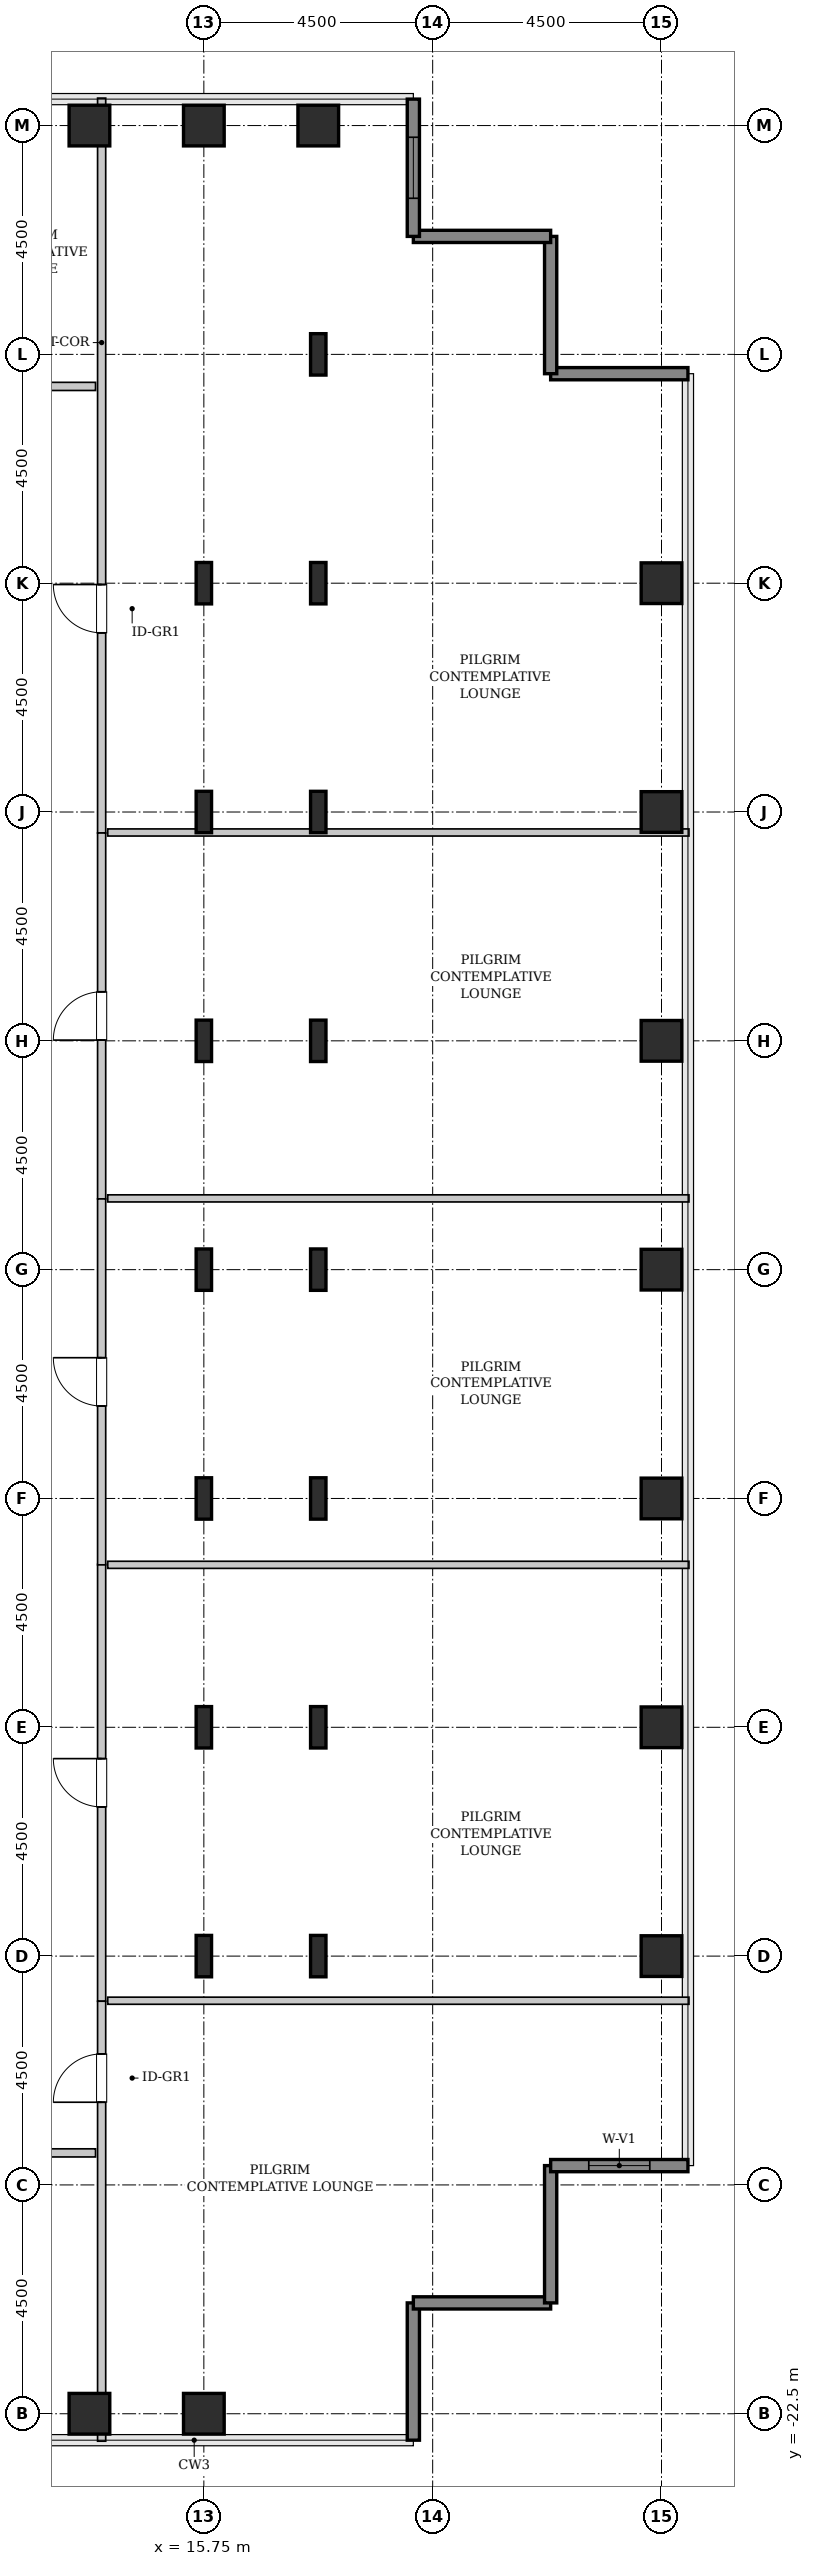
"""IFC4 building model, lengths in metres.
Left out: names, types, materials, properties, quantities, classifications, styles, units other than length and angle.
Written with IfcOpenShell. Run it as: python <this file> out.ifc"""

import sys

from ifc_helpers import new_model, si_unit, direction, frame, frame_2d, origin, origin_2d, place, context, subcontext, project, spatial, rectangle, hollow_rectangle, i_section, extrude, source, transform, mapped, element, fill, save


model = new_model("IFC4")
c1 = context("Model", 3, precision=1e-05, world=origin(), true_north=direction((0.0, 1.0)))
c2 = subcontext(c1, "Body", "Model", "MODEL_VIEW")
j1 = project(units=[si_unit("LENGTHUNIT", "METRE"), si_unit("PLANEANGLEUNIT", "RADIAN")], contexts=[c1])
p1 = place(None, origin())
s1 = spatial("IfcSite", under=j1, at=p1, CompositionType="ELEMENT")
p2 = place(p1, origin())
s2 = spatial("IfcBuilding", under=s1, at=p2, CompositionType="ELEMENT")
p3 = place(p2, frame((0.0, 0.0, 186.8)))
s3 = spatial("IfcBuildingStorey", under=s2, at=p3, CompositionType="ELEMENT", Elevation=186.8)
m1 = source(origin(), c2, "Body", "SweptSolid", [
    extrude(hollow_rectangle(XDim=0.8, YDim=0.8, WallThickness=0.04, InnerFilletRadius=0.04, OuterFilletRadius=0.08, at=origin_2d()), origin(), (0.0, 0.0, 1.0), 3.8),
])
for number, where, z_axis, x_axis in (
    (1, (13.5, -22.5, 0.0), (0.0, 0.0, 1.0), (1.0, 0.0, 0.0)),
    (2, (13.5, 22.5, 0.0), (0.0, 0.0, 1.0), (1.0, 0.0, 0.0)),
    (3, (15.75, -22.5, 0.0), (0.0, 0.0, 1.0), (1.0, 0.0, 0.0)),
):
    element("IfcColumn", number, at=place(p3, frame(where, z_axis=z_axis, x_axis=x_axis)), inside=s3, PredefinedType="COLUMN", context=c2, shape_type="MappedRepresentation", body=[
        mapped(m1, transform((0.0, 0.0, 0.0), x_axis=(1.0, 0.0, 0.0), y_axis=(0.0, 1.0, 0.0), z_axis=(0.0, 0.0, 1.0), scale=1.0)),
    ])
m2 = source(origin(), c2, "Body", "SweptSolid", [
    extrude(i_section(OverallWidth=0.303, OverallDepth=0.814, WebThickness=0.021, FlangeThickness=0.04, FilletRadius=0.03, at=origin_2d()), origin(), (0.0, 0.0, 1.0), 3.8),
])
for number, where, z_axis, x_axis in (
    (4, (15.75, -13.5, 0.0), (0.0, 0.0, 1.0), (1.0, 0.0, 0.0)),
    (5, (15.75, -9.0, 0.0), (0.0, 0.0, 1.0), (1.0, 0.0, 0.0)),
    (6, (15.75, -4.5, 0.0), (0.0, 0.0, 1.0), (1.0, 0.0, 0.0)),
    (7, (15.75, 0.0, 0.0), (0.0, 0.0, 1.0), (1.0, 0.0, 0.0)),
    (8, (15.75, 4.5, 0.0), (0.0, 0.0, 1.0), (1.0, 0.0, 0.0)),
    (9, (15.75, 9.0, 0.0), (0.0, 0.0, 1.0), (1.0, 0.0, 0.0)),
    (10, (15.75, 13.5, 0.0), (0.0, 0.0, 1.0), (1.0, 0.0, 0.0)),
):
    element("IfcColumn", number, at=place(p3, frame(where, z_axis=z_axis, x_axis=x_axis)), inside=s3, PredefinedType="COLUMN", context=c2, shape_type="MappedRepresentation", body=[
        mapped(m2, transform((0.0, 0.0, 0.0), x_axis=(1.0, 0.0, 0.0), y_axis=(0.0, 1.0, 0.0), z_axis=(0.0, 0.0, 1.0), scale=1.0)),
    ])
p4 = place(p3, frame((15.75, 22.5, 0.0), z_axis=(0.0, 0.0, 1.0), x_axis=(1.0, 0.0, 0.0)))
e11 = element("IfcColumn", 11, at=p4, inside=s3, PredefinedType="COLUMN", context=c2, shape_type="MappedRepresentation", body=[
    mapped(m1, transform((0.0, 0.0, 0.0), x_axis=(1.0, 0.0, 0.0), y_axis=(0.0, 1.0, 0.0), z_axis=(0.0, 0.0, 1.0), scale=1.0)),
])
for number, where, z_axis, x_axis in (
    (12, (18.0, -13.5, 0.0), (0.0, 0.0, 1.0), (1.0, 0.0, 0.0)),
    (13, (18.0, -9.0, 0.0), (0.0, 0.0, 1.0), (1.0, 0.0, 0.0)),
    (14, (18.0, -4.5, 0.0), (0.0, 0.0, 1.0), (1.0, 0.0, 0.0)),
    (15, (18.0, 0.0, 0.0), (0.0, 0.0, 1.0), (1.0, 0.0, 0.0)),
    (16, (18.0, 4.5, 0.0), (0.0, 0.0, 1.0), (1.0, 0.0, 0.0)),
    (17, (18.0, 9.0, 0.0), (0.0, 0.0, 1.0), (1.0, 0.0, 0.0)),
    (18, (18.0, 13.5, 0.0), (0.0, 0.0, 1.0), (1.0, 0.0, 0.0)),
    (19, (18.0, 18.0, 0.0), (0.0, 0.0, 1.0), (1.0, 0.0, 0.0)),
):
    element("IfcColumn", number, at=place(p3, frame(where, z_axis=z_axis, x_axis=x_axis)), inside=s3, PredefinedType="COLUMN", context=c2, shape_type="MappedRepresentation", body=[
        mapped(m2, transform((0.0, 0.0, 0.0), x_axis=(1.0, 0.0, 0.0), y_axis=(0.0, 1.0, 0.0), z_axis=(0.0, 0.0, 1.0), scale=1.0)),
    ])
for number, where, z_axis, x_axis in (
    (20, (18.0, 22.5, 0.0), (0.0, 0.0, 1.0), (1.0, 0.0, 0.0)),
    (21, (24.75, -13.5, 0.0), (0.0, 0.0, 1.0), (1.0, 0.0, 0.0)),
    (22, (24.75, -9.0, 0.0), (0.0, 0.0, 1.0), (1.0, 0.0, 0.0)),
    (23, (24.75, -4.5, 0.0), (0.0, 0.0, 1.0), (1.0, 0.0, 0.0)),
    (24, (24.75, 0.0, 0.0), (0.0, 0.0, 1.0), (1.0, 0.0, 0.0)),
    (25, (24.75, 4.5, 0.0), (0.0, 0.0, 1.0), (1.0, 0.0, 0.0)),
    (26, (24.75, 9.0, 0.0), (0.0, 0.0, 1.0), (1.0, 0.0, 0.0)),
    (27, (24.75, 13.5, 0.0), (0.0, 0.0, 1.0), (1.0, 0.0, 0.0)),
):
    element("IfcColumn", number, at=place(p3, frame(where, z_axis=z_axis, x_axis=x_axis)), inside=s3, PredefinedType="COLUMN", context=c2, shape_type="MappedRepresentation", body=[
        mapped(m1, transform((0.0, 0.0, 0.0), x_axis=(1.0, 0.0, 0.0), y_axis=(0.0, 1.0, 0.0), z_axis=(0.0, 0.0, 1.0), scale=1.0)),
    ])
m3 = source(origin(), c2, "Body", "SweptSolid", [
    extrude(rectangle(XDim=2.7, YDim=0.24, at=frame_2d((1.35, 0.0))), origin(), (0.0, 0.0, 1.0), 3.55),
])
for number, where, z_axis, x_axis in (
    (28, (19.87, -23.02, 0.0), (0.0, 0.0, 1.0), (0.0, 1.0, 0.0)),
    (29, (19.87, -20.32, 0.0), (0.0, 0.0, 1.0), (1.0, 0.0, 0.0)),
    (30, (22.57, -20.32, 0.0), (0.0, 0.0, 1.0), (0.0, 1.0, 0.0)),
):
    element("IfcWall", number, at=place(p3, frame(where, z_axis=z_axis, x_axis=x_axis)), inside=s3, PredefinedType="SHEAR", context=c2, shape_type="MappedRepresentation", body=[
        mapped(m3, transform((0.0, 0.0, 0.0), x_axis=(1.0, 0.0, 0.0), y_axis=(0.0, 1.0, 0.0), z_axis=(0.0, 0.0, 1.0), scale=1.0)),
    ])
p5 = place(p3, frame((22.57, -17.62, 0.0), z_axis=(0.0, 0.0, 1.0), x_axis=(1.0, 0.0, 0.0)))
e31 = element("IfcWall", 31, at=p5, inside=s3, PredefinedType="SHEAR", context=c2, shape_type="MappedRepresentation", body=[
    mapped(m3, transform((0.0, 0.0, 0.0), x_axis=(1.0, 0.0, 0.0), y_axis=(0.0, 1.0, 0.0), z_axis=(0.0, 0.0, 1.0), scale=1.0)),
])
p6 = place(p5, frame((0.75, 0.0, 0.85)))
e32 = element("IfcOpeningElement", 32, at=p6, cuts=e31, PredefinedType="OPENING", context=c2, shape_type="SweptSolid", body=[
    extrude(rectangle(XDim=1.2, YDim=1.8, at=frame_2d((0.6, 0.9))), frame((0.0, 0.13, 0.0), z_axis=(0.0, -1.0, 0.0), x_axis=(1.0, 0.0, 0.0)), (0.0, 0.0, 1.0), 0.26),
])
for number, where, z_axis, x_axis in (
    (33, (25.27, 17.62, 0.0), (0.0, 0.0, 1.0), (-1.0, 0.0, 0.0)),
    (34, (22.57, 17.62, 0.0), (0.0, 0.0, 1.0), (0.0, 1.0, 0.0)),
    (35, (22.57, 20.32, 0.0), (0.0, 0.0, 1.0), (-1.0, 0.0, 0.0)),
):
    element("IfcWall", number, at=place(p3, frame(where, z_axis=z_axis, x_axis=x_axis)), inside=s3, PredefinedType="SHEAR", context=c2, shape_type="MappedRepresentation", body=[
        mapped(m3, transform((0.0, 0.0, 0.0), x_axis=(1.0, 0.0, 0.0), y_axis=(0.0, 1.0, 0.0), z_axis=(0.0, 0.0, 1.0), scale=1.0)),
    ])
p7 = place(p3, frame((19.87, 20.32, 0.0), z_axis=(0.0, 0.0, 1.0), x_axis=(0.0, 1.0, 0.0)))
e36 = element("IfcWall", 36, at=p7, inside=s3, PredefinedType="SHEAR", context=c2, shape_type="MappedRepresentation", body=[
    mapped(m3, transform((0.0, 0.0, 0.0), x_axis=(1.0, 0.0, 0.0), y_axis=(0.0, 1.0, 0.0), z_axis=(0.0, 0.0, 1.0), scale=1.0)),
])
p8 = place(p7, frame((0.75, 0.0, 0.85)))
e37 = element("IfcOpeningElement", 37, at=p8, cuts=e36, PredefinedType="OPENING", context=c2, shape_type="SweptSolid", body=[
    extrude(rectangle(XDim=1.2, YDim=1.8, at=frame_2d((0.6, 0.9))), frame((0.0, 0.13, 0.0), z_axis=(0.0, -1.0, 0.0), x_axis=(1.0, 0.0, 0.0)), (0.0, 0.0, 1.0), 0.26),
])
m4 = source(origin(), c2, "Body", "SweptSolid", [
    extrude(rectangle(XDim=8.593, YDim=0.16, at=frame_2d((4.296, 0.0))), origin(), (0.0, 0.0, 1.0), 3.535),
])
p9 = place(p3, frame((13.74, -14.387, 0.0), z_axis=(0.0, 0.0, 1.0), x_axis=(0.0, 1.0, 0.0)))
e38 = element("IfcWall", 38, at=p9, inside=s3, PredefinedType="PARTITIONING", context=c2, shape_type="MappedRepresentation", body=[
    mapped(m4, transform((0.0, 0.0, 0.0), x_axis=(1.0, 0.0, 0.0), y_axis=(0.0, 1.0, 0.0), z_axis=(0.0, 0.0, 1.0), scale=1.0)),
])
p10 = place(p9, frame((3.821, 0.0, 0.0)))
e39 = element("IfcOpeningElement", 39, at=p10, cuts=e38, PredefinedType="OPENING", context=c2, shape_type="SweptSolid", body=[
    extrude(rectangle(XDim=0.95, YDim=2.1, at=frame_2d((0.475, 1.05))), frame((0.0, 0.09, 0.0), z_axis=(0.0, -1.0, 0.0), x_axis=(1.0, 0.0, 0.0)), (0.0, 0.0, 1.0), 0.18),
])
m5 = source(origin(), c2, "Body", "SweptSolid", [
    extrude(rectangle(XDim=11.43, YDim=0.14, at=frame_2d((5.715, 0.0))), origin(), (0.0, 0.0, 1.0), 3.535),
])
for number, where, z_axis, x_axis in (
    (40, (13.86, -14.377, 0.0), (0.0, 0.0, 1.0), (1.0, 0.0, 0.0)),
    (41, (13.86, -5.805, 0.0), (0.0, 0.0, 1.0), (1.0, 0.0, 0.0)),
):
    element("IfcWall", number, at=place(p3, frame(where, z_axis=z_axis, x_axis=x_axis)), inside=s3, PredefinedType="PARTITIONING", context=c2, shape_type="MappedRepresentation", body=[
        mapped(m5, transform((0.0, 0.0, 0.0), x_axis=(1.0, 0.0, 0.0), y_axis=(0.0, 1.0, 0.0), z_axis=(0.0, 0.0, 1.0), scale=1.0)),
    ])
m6 = source(origin(), c2, "Body", "SweptSolid", [
    extrude(rectangle(XDim=8.653, YDim=0.16, at=frame_2d((4.326, 0.0))), origin(), (0.0, 0.0, 1.0), 3.535),
])
p11 = place(p3, frame((13.74, -23.04, 0.0), z_axis=(0.0, 0.0, 1.0), x_axis=(0.0, 1.0, 0.0)))
e42 = element("IfcWall", 42, at=p11, inside=s3, PredefinedType="PARTITIONING", context=c2, shape_type="MappedRepresentation", body=[
    mapped(m6, transform((0.0, 0.0, 0.0), x_axis=(1.0, 0.0, 0.0), y_axis=(0.0, 1.0, 0.0), z_axis=(0.0, 0.0, 1.0), scale=1.0)),
])
p12 = place(p11, frame((6.666, 0.0, 0.0)))
e43 = element("IfcOpeningElement", 43, at=p12, cuts=e42, PredefinedType="OPENING", context=c2, shape_type="SweptSolid", body=[
    extrude(rectangle(XDim=0.95, YDim=2.1, at=frame_2d((0.475, 1.05))), frame((0.0, 0.09, 0.0), z_axis=(0.0, -1.0, 0.0), x_axis=(1.0, 0.0, 0.0)), (0.0, 0.0, 1.0), 0.18),
])
m7 = source(origin(), c2, "Body", "SweptSolid", [
    extrude(rectangle(XDim=14.453, YDim=0.16, at=frame_2d((7.226, 0.0))), origin(), (0.0, 0.0, 1.0), 3.535),
])
p13 = place(p3, frame((13.74, 8.587, 0.0), z_axis=(0.0, 0.0, 1.0), x_axis=(0.0, 1.0, 0.0)))
e44 = element("IfcWall", 44, at=p13, inside=s3, PredefinedType="PARTITIONING", context=c2, shape_type="MappedRepresentation", body=[
    mapped(m7, transform((0.0, 0.0, 0.0), x_axis=(1.0, 0.0, 0.0), y_axis=(0.0, 1.0, 0.0), z_axis=(0.0, 0.0, 1.0), scale=1.0)),
])
p14 = place(p13, frame((3.936, 0.0, 0.0)))
e45 = element("IfcOpeningElement", 45, at=p14, cuts=e44, PredefinedType="OPENING", context=c2, shape_type="SweptSolid", body=[
    extrude(rectangle(XDim=0.95, YDim=2.1, at=frame_2d((0.475, 1.05))), frame((0.0, 0.09, 0.0), z_axis=(0.0, -1.0, 0.0), x_axis=(1.0, 0.0, 0.0)), (0.0, 0.0, 1.0), 0.18),
])
m8 = source(origin(), c2, "Body", "SweptSolid", [
    extrude(rectangle(XDim=11.43, YDim=0.14, at=frame_2d((5.715, 0.0))), origin(), (0.0, 0.0, 1.0), 2.875),
])
p15 = place(p3, frame((13.86, 8.597, 0.0), z_axis=(0.0, 0.0, 1.0), x_axis=(1.0, 0.0, 0.0)))
e46 = element("IfcWall", 46, at=p15, inside=s3, PredefinedType="PARTITIONING", context=c2, shape_type="MappedRepresentation", body=[
    mapped(m8, transform((0.0, 0.0, 0.0), x_axis=(1.0, 0.0, 0.0), y_axis=(0.0, 1.0, 0.0), z_axis=(0.0, 0.0, 1.0), scale=1.0)),
])
m9 = source(origin(), c2, "Body", "SweptSolid", [
    extrude(rectangle(XDim=7.196, YDim=0.16, at=frame_2d((3.598, 0.0))), origin(), (0.0, 0.0, 1.0), 3.535),
])
p16 = place(p3, frame((13.74, 1.391, 0.0), z_axis=(0.0, 0.0, 1.0), x_axis=(0.0, 1.0, 0.0)))
e47 = element("IfcWall", 47, at=p16, inside=s3, PredefinedType="PARTITIONING", context=c2, shape_type="MappedRepresentation", body=[
    mapped(m9, transform((0.0, 0.0, 0.0), x_axis=(1.0, 0.0, 0.0), y_axis=(0.0, 1.0, 0.0), z_axis=(0.0, 0.0, 1.0), scale=1.0)),
])
p17 = place(p16, frame((3.123, 0.0, 0.0)))
e48 = element("IfcOpeningElement", 48, at=p17, cuts=e47, PredefinedType="OPENING", context=c2, shape_type="SweptSolid", body=[
    extrude(rectangle(XDim=0.95, YDim=2.1, at=frame_2d((0.475, 1.05))), frame((0.0, 0.09, 0.0), z_axis=(0.0, -1.0, 0.0), x_axis=(1.0, 0.0, 0.0)), (0.0, 0.0, 1.0), 0.18),
])
p18 = place(p3, frame((13.86, 1.401, 0.0), z_axis=(0.0, 0.0, 1.0), x_axis=(1.0, 0.0, 0.0)))
e49 = element("IfcWall", 49, at=p18, inside=s3, PredefinedType="PARTITIONING", context=c2, shape_type="MappedRepresentation", body=[
    mapped(m5, transform((0.0, 0.0, 0.0), x_axis=(1.0, 0.0, 0.0), y_axis=(0.0, 1.0, 0.0), z_axis=(0.0, 0.0, 1.0), scale=1.0)),
])
m10 = source(origin(), c2, "Body", "SweptSolid", [
    extrude(rectangle(XDim=7.196, YDim=0.16, at=frame_2d((3.598, 0.0))), origin(), (0.0, 0.0, 1.0), 3.535),
])
p19 = place(p3, frame((13.74, -5.805, 0.0), z_axis=(0.0, 0.0, 1.0), x_axis=(0.0, 1.0, 0.0)))
e50 = element("IfcWall", 50, at=p19, inside=s3, PredefinedType="PARTITIONING", context=c2, shape_type="MappedRepresentation", body=[
    mapped(m10, transform((0.0, 0.0, 0.0), x_axis=(1.0, 0.0, 0.0), y_axis=(0.0, 1.0, 0.0), z_axis=(0.0, 0.0, 1.0), scale=1.0)),
])
p20 = place(p19, frame((3.123, 0.0, 0.0)))
e51 = element("IfcOpeningElement", 51, at=p20, cuts=e50, PredefinedType="OPENING", context=c2, shape_type="SweptSolid", body=[
    extrude(rectangle(XDim=0.95, YDim=2.1, at=frame_2d((0.475, 1.05))), frame((0.0, 0.09, 0.0), z_axis=(0.0, -1.0, 0.0), x_axis=(1.0, 0.0, 0.0)), (0.0, 0.0, 1.0), 0.18),
])
m11 = source(origin(), c2, "Body", "SweptSolid", [
    extrude(rectangle(XDim=5.225, YDim=0.16, at=frame_2d((2.613, 0.0))), origin(), (0.0, 0.0, 1.0), 3.535),
])
p21 = place(p3, frame((8.395, 17.37, 0.0), z_axis=(0.0, 0.0, 1.0), x_axis=(1.0, 0.0, 0.0)))
e52 = element("IfcWall", 52, at=p21, inside=s3, PredefinedType="PARTITIONING", context=c2, shape_type="MappedRepresentation", body=[
    mapped(m11, transform((0.0, 0.0, 0.0), x_axis=(1.0, 0.0, 0.0), y_axis=(0.0, 1.0, 0.0), z_axis=(0.0, 0.0, 1.0), scale=1.0)),
])
p22 = place(p21, frame((1.543, 0.0, 0.0)))
e53 = element("IfcOpeningElement", 53, at=p22, cuts=e52, PredefinedType="OPENING", context=c2, shape_type="SweptSolid", body=[
    extrude(rectangle(XDim=0.95, YDim=2.1, at=frame_2d((0.475, 1.05))), frame((0.0, 0.09, 0.0), z_axis=(0.0, -1.0, 0.0), x_axis=(1.0, 0.0, 0.0)), (0.0, 0.0, 1.0), 0.18),
])
m12 = source(origin(), c2, "Body", "SweptSolid", [
    extrude(rectangle(XDim=7.225, YDim=0.16, at=frame_2d((3.613, 0.0))), origin(), (0.0, 0.0, 1.0), 3.535),
])
p23 = place(p3, frame((6.395, -17.37, 0.0), z_axis=(0.0, 0.0, 1.0), x_axis=(1.0, 0.0, 0.0)))
e54 = element("IfcWall", 54, at=p23, inside=s3, PredefinedType="PARTITIONING", context=c2, shape_type="MappedRepresentation", body=[
    mapped(m12, transform((0.0, 0.0, 0.0), x_axis=(1.0, 0.0, 0.0), y_axis=(0.0, 1.0, 0.0), z_axis=(0.0, 0.0, 1.0), scale=1.0)),
])
p24 = place(p23, frame((3.137, 0.0, 0.0)))
e55 = element("IfcOpeningElement", 55, at=p24, cuts=e54, PredefinedType="OPENING", context=c2, shape_type="SweptSolid", body=[
    extrude(rectangle(XDim=0.95, YDim=2.1, at=frame_2d((0.475, 1.05))), frame((0.0, 0.09, 0.0), z_axis=(0.0, -1.0, 0.0), x_axis=(1.0, 0.0, 0.0)), (0.0, 0.0, 1.0), 0.18),
])
m13 = source(origin(), c2, "Body", "SweptSolid", [
    extrude(rectangle(XDim=1.2, YDim=1.8, at=frame_2d((0.6, 0.9))), frame((0.0, 0.03, 0.0), z_axis=(0.0, -1.0, 0.0), x_axis=(1.0, 0.0, 0.0)), (0.0, 0.0, 1.0), 0.06),
])
p25 = place(p6, origin())
e56 = element("IfcWindow", 56, at=p25, inside=s3, PartitioningType="SINGLE_PANEL", PredefinedType="WINDOW", context=c2, shape_type="MappedRepresentation", body=[
    mapped(m13, transform((0.0, 0.0, 0.0), x_axis=(1.0, 0.0, 0.0), y_axis=(0.0, 1.0, 0.0), z_axis=(0.0, 0.0, 1.0), scale=1.0)),
])
fill(e32, e56)
p26 = place(p8, origin())
e57 = element("IfcWindow", 57, at=p26, inside=s3, PartitioningType="SINGLE_PANEL", PredefinedType="WINDOW", context=c2, shape_type="MappedRepresentation", body=[
    mapped(m13, transform((0.0, 0.0, 0.0), x_axis=(1.0, 0.0, 0.0), y_axis=(0.0, 1.0, 0.0), z_axis=(0.0, 0.0, 1.0), scale=1.0)),
])
fill(e37, e57)
m14 = source(origin(), c2, "Body", "SweptSolid", [
    extrude(rectangle(XDim=0.95, YDim=2.1, at=frame_2d((0.475, 1.05))), frame((0.0, 0.025, 0.0), z_axis=(0.0, -1.0, 0.0), x_axis=(1.0, 0.0, 0.0)), (0.0, 0.0, 1.0), 0.05),
])
p27 = place(p10, origin())
e58 = element("IfcDoor", 58, at=p27, inside=s3, OperationType="SINGLE_SWING_RIGHT", PredefinedType="DOOR", context=c2, shape_type="MappedRepresentation", body=[
    mapped(m14, transform((0.0, 0.0, 0.0), x_axis=(1.0, 0.0, 0.0), y_axis=(0.0, 1.0, 0.0), z_axis=(0.0, 0.0, 1.0), scale=1.0)),
])
fill(e39, e58)
p28 = place(p12, origin())
e59 = element("IfcDoor", 59, at=p28, inside=s3, OperationType="SINGLE_SWING_LEFT", PredefinedType="DOOR", context=c2, shape_type="MappedRepresentation", body=[
    mapped(m14, transform((0.0, 0.0, 0.0), x_axis=(1.0, 0.0, 0.0), y_axis=(0.0, 1.0, 0.0), z_axis=(0.0, 0.0, 1.0), scale=1.0)),
])
fill(e43, e59)
p29 = place(p14, origin())
e60 = element("IfcDoor", 60, at=p29, inside=s3, OperationType="SINGLE_SWING_RIGHT", PredefinedType="DOOR", context=c2, shape_type="MappedRepresentation", body=[
    mapped(m14, transform((0.0, 0.0, 0.0), x_axis=(1.0, 0.0, 0.0), y_axis=(0.0, 1.0, 0.0), z_axis=(0.0, 0.0, 1.0), scale=1.0)),
])
fill(e45, e60)
p30 = place(p17, origin())
e61 = element("IfcDoor", 61, at=p30, inside=s3, OperationType="SINGLE_SWING_LEFT", PredefinedType="DOOR", context=c2, shape_type="MappedRepresentation", body=[
    mapped(m14, transform((0.0, 0.0, 0.0), x_axis=(1.0, 0.0, 0.0), y_axis=(0.0, 1.0, 0.0), z_axis=(0.0, 0.0, 1.0), scale=1.0)),
])
fill(e48, e61)
p31 = place(p20, origin())
e62 = element("IfcDoor", 62, at=p31, inside=s3, OperationType="SINGLE_SWING_RIGHT", PredefinedType="DOOR", context=c2, shape_type="MappedRepresentation", body=[
    mapped(m14, transform((0.0, 0.0, 0.0), x_axis=(1.0, 0.0, 0.0), y_axis=(0.0, 1.0, 0.0), z_axis=(0.0, 0.0, 1.0), scale=1.0)),
])
fill(e51, e62)
save(model, sys.argv[1])
